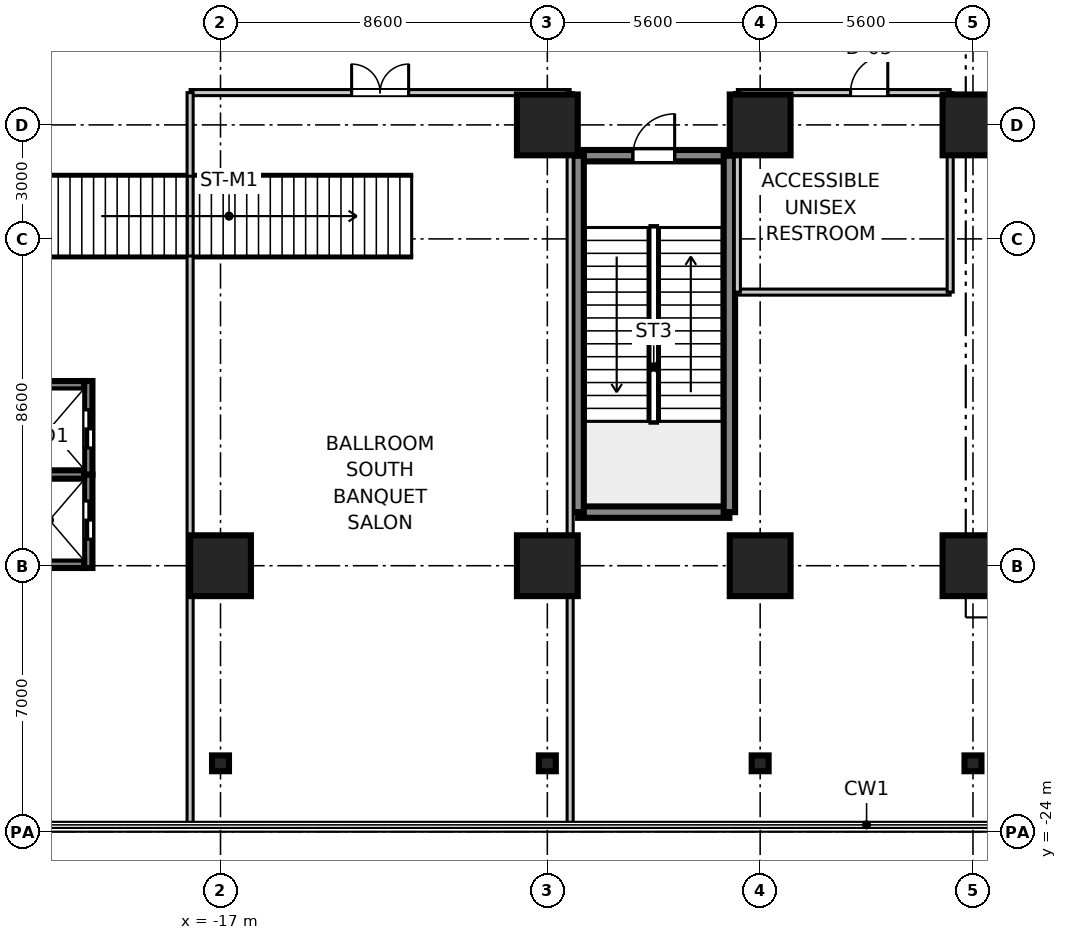
"""IFC4 building model, lengths in metres.
Left out: names, types, materials, properties, quantities, classifications, styles, units other than length and angle.
Written with IfcOpenShell. Run it as: python <this file> out.ifc"""

import sys

from ifc_helpers import new_model, si_unit, direction, frame, frame_2d, origin, origin_2d, place, context, subcontext, project, spatial, rectangle, i_section, extrude, source, transform, mapped, element, fill, save


model = new_model("IFC4")
c1 = context("Model", 3, precision=1e-05, world=origin(), true_north=direction((0.0, 1.0)))
c2 = subcontext(c1, "Body", "Model", "MODEL_VIEW")
j1 = project(units=[si_unit("LENGTHUNIT", "METRE"), si_unit("PLANEANGLEUNIT", "RADIAN")], contexts=[c1])
p1 = place(None, origin())
s1 = spatial("IfcSite", under=j1, at=p1, CompositionType="ELEMENT")
p2 = place(p1, origin())
s2 = spatial("IfcBuilding", under=s1, at=p2, CompositionType="ELEMENT")
p3 = place(p2, frame((0.0, 0.0, 16.2)))
s3 = spatial("IfcBuildingStorey", under=s2, at=p3, CompositionType="ELEMENT", Elevation=16.2)
m1 = source(origin(), c2, "Body", "SweptSolid", [
    extrude(rectangle(XDim=1.6, YDim=1.6, at=origin_2d()), origin(), (0.0, 0.0, 1.0), 5.355),
])
for number, where, z_axis, x_axis in (
    (1, (-17.0, -17.0, 0.0), (0.0, 0.0, 1.0), (1.0, 0.0, 0.0)),
    (2, (-8.4, -17.0, 0.0), (0.0, 0.0, 1.0), (1.0, 0.0, 0.0)),
    (3, (-8.4, -5.4, 0.0), (0.0, 0.0, 1.0), (1.0, 0.0, 0.0)),
    (4, (-2.8, -17.0, 0.0), (0.0, 0.0, 1.0), (1.0, 0.0, 0.0)),
    (5, (-2.8, -5.4, 0.0), (0.0, 0.0, 1.0), (1.0, 0.0, 0.0)),
    (6, (2.8, -17.0, 0.0), (0.0, 0.0, 1.0), (1.0, 0.0, 0.0)),
    (7, (2.8, -5.4, 0.0), (0.0, 0.0, 1.0), (1.0, 0.0, 0.0)),
):
    element("IfcColumn", number, at=place(p3, frame(where, z_axis=z_axis, x_axis=x_axis)), inside=s3, PredefinedType="COLUMN", context=c2, shape_type="MappedRepresentation", body=[
        mapped(m1, transform((0.0, 0.0, 0.0), scale=1.0)),
    ])
m2 = source(origin(), c2, "Body", "SweptSolid", [
    extrude(i_section(OverallWidth=0.416, OverallDepth=0.446, WebThickness=0.025, FlangeThickness=0.04, at=origin_2d()), origin(), (0.0, 0.0, 1.0), 5.355),
])
for number, where, z_axis, x_axis in (
    (8, (-17.0, -22.2, 0.0), (0.0, 0.0, 1.0), (0.0, 1.0, 0.0)),
    (9, (-8.4, -22.2, 0.0), (0.0, 0.0, 1.0), (0.0, 1.0, 0.0)),
    (10, (-2.8, -22.2, 0.0), (0.0, 0.0, 1.0), (0.0, 1.0, 0.0)),
    (11, (2.8, -22.2, 0.0), (0.0, 0.0, 1.0), (0.0, 1.0, 0.0)),
):
    element("IfcColumn", number, at=place(p3, frame(where, z_axis=z_axis, x_axis=x_axis)), inside=s3, PredefinedType="COLUMN", context=c2, shape_type="MappedRepresentation", body=[
        mapped(m2, transform((0.0, 0.0, 0.0), scale=1.0)),
    ])
m3 = source(origin(), c2, "Body", "SweptSolid", [
    extrude(rectangle(XDim=3.98, YDim=0.3, at=frame_2d((1.99, 0.0))), origin(), (0.0, 0.0, 1.0), 5.08),
])
p4 = place(p3, frame((-7.59, -15.59, 0.0), z_axis=(0.0, 0.0, 1.0), x_axis=(1.0, 0.0, 0.0)))
e12 = element("IfcWall", 12, at=p4, inside=s3, PredefinedType="SHEAR", context=c2, shape_type="MappedRepresentation", body=[
    mapped(m3, transform((0.0, 0.0, 0.0), scale=1.0)),
])
p5 = place(p3, frame((-7.59, -6.21, 0.0), z_axis=(0.0, 0.0, 1.0), x_axis=(1.0, 0.0, 0.0)))
e13 = element("IfcWall", 13, at=p5, inside=s3, PredefinedType="SHEAR", context=c2, shape_type="MappedRepresentation", body=[
    mapped(m3, transform((0.0, 0.0, 0.0), scale=1.0)),
])
p6 = place(p5, frame((1.44, 0.0, 0.0)))
e14 = element("IfcOpeningElement", 14, at=p6, cuts=e13, PredefinedType="OPENING", context=c2, shape_type="SweptSolid", body=[
    extrude(rectangle(XDim=1.1, YDim=2.15, at=frame_2d((0.55, 1.075))), frame((0.0, 0.16, 0.0), z_axis=(0.0, -1.0, 0.0), x_axis=(1.0, 0.0, 0.0)), (0.0, 0.0, 1.0), 0.32),
])
m4 = source(origin(), c2, "Body", "SweptSolid", [
    extrude(rectangle(XDim=9.38, YDim=0.3, at=frame_2d((4.69, 0.0))), origin(), (0.0, 0.0, 1.0), 5.08),
])
for number, where, z_axis, x_axis in (
    (15, (-7.59, -15.59, 0.0), (0.0, 0.0, 1.0), (0.0, 1.0, 0.0)),
    (16, (-3.61, -15.59, 0.0), (0.0, 0.0, 1.0), (0.0, 1.0, 0.0)),
):
    element("IfcWall", number, at=place(p3, frame(where, z_axis=z_axis, x_axis=x_axis)), inside=s3, PredefinedType="SHEAR", context=c2, shape_type="MappedRepresentation", body=[
        mapped(m4, transform((0.0, 0.0, 0.0), scale=1.0)),
    ])
m5 = source(origin(), c2, "Body", "SweptSolid", [
    extrude(rectangle(XDim=2.46, YDim=0.22, at=frame_2d((1.23, 0.0))), origin(), (0.0, 0.0, 1.0), 5.08),
])
p7 = place(p3, frame((-20.48, -17.06, 0.0), z_axis=(0.0, 0.0, 1.0), x_axis=(0.0, 1.0, 0.0)))
e17 = element("IfcWall", 17, at=p7, inside=s3, PredefinedType="SHEAR", context=c2, shape_type="MappedRepresentation", body=[
    mapped(m5, transform((0.0, 0.0, 0.0), scale=1.0)),
])
p8 = place(p7, frame((0.76, 0.0, 0.0)))
e18 = element("IfcOpeningElement", 18, at=p8, cuts=e17, PredefinedType="OPENING", context=c2, shape_type="SweptSolid", body=[
    extrude(rectangle(XDim=1.0, YDim=2.2, at=frame_2d((0.5, 1.1))), frame((0.0, 0.12, 0.0), z_axis=(0.0, -1.0, 0.0), x_axis=(1.0, 0.0, 0.0)), (0.0, 0.0, 1.0), 0.24),
])
m6 = source(origin(), c2, "Body", "SweptSolid", [
    extrude(rectangle(XDim=1.82, YDim=0.22, at=frame_2d((0.91, 0.0))), origin(), (0.0, 0.0, 1.0), 5.08),
])
p9 = place(p3, frame((-22.41, -16.95, 0.0), z_axis=(0.0, 0.0, 1.0), x_axis=(1.0, 0.0, 0.0)))
e19 = element("IfcWall", 19, at=p9, inside=s3, PredefinedType="SHEAR", context=c2, shape_type="MappedRepresentation", body=[
    mapped(m6, transform((0.0, 0.0, 0.0), scale=1.0)),
])
m7 = source(origin(), c2, "Body", "SweptSolid", [
    extrude(rectangle(XDim=1.82, YDim=0.22, at=frame_2d((0.91, 0.0))), origin(), (0.0, 0.0, 1.0), 5.4),
])
p10 = place(p3, frame((-22.41, -14.6, 0.0), z_axis=(0.0, 0.0, 1.0), x_axis=(1.0, 0.0, 0.0)))
e20 = element("IfcWall", 20, at=p10, inside=s3, PredefinedType="SHEAR", context=c2, shape_type="MappedRepresentation", body=[
    mapped(m7, transform((0.0, 0.0, 0.0), scale=1.0)),
])
m8 = source(origin(), c2, "Body", "SweptSolid", [
    extrude(rectangle(XDim=2.46, YDim=0.22, at=frame_2d((1.23, 0.0))), origin(), (0.0, 0.0, 1.0), 5.08),
])
p11 = place(p3, frame((-20.48, -14.6, 0.0), z_axis=(0.0, 0.0, 1.0), x_axis=(0.0, 1.0, 0.0)))
e21 = element("IfcWall", 21, at=p11, inside=s3, PredefinedType="SHEAR", context=c2, shape_type="MappedRepresentation", body=[
    mapped(m8, transform((0.0, 0.0, 0.0), scale=1.0)),
])
p12 = place(p11, frame((0.7, 0.0, 0.0)))
e22 = element("IfcOpeningElement", 22, at=p12, cuts=e21, PredefinedType="OPENING", context=c2, shape_type="SweptSolid", body=[
    extrude(rectangle(XDim=1.0, YDim=2.2, at=frame_2d((0.5, 1.1))), frame((0.0, 0.12, 0.0), z_axis=(0.0, -1.0, 0.0), x_axis=(1.0, 0.0, 0.0)), (0.0, 0.0, 1.0), 0.24),
])
p13 = place(p3, frame((-22.41, -12.25, 0.0), z_axis=(0.0, 0.0, 1.0), x_axis=(1.0, 0.0, 0.0)))
e23 = element("IfcWall", 23, at=p13, inside=s3, PredefinedType="SHEAR", context=c2, shape_type="MappedRepresentation", body=[
    mapped(m6, transform((0.0, 0.0, 0.0), scale=1.0)),
])
m9 = source(origin(), c2, "Body", "SweptSolid", [
    extrude(rectangle(XDim=10.0, YDim=0.16, at=frame_2d((5.0, 0.0))), origin(), (0.0, 0.0, 1.0), 3.4),
])
p14 = place(p3, frame((-17.8, -4.55, 0.0), z_axis=(0.0, 0.0, 1.0), x_axis=(1.0, 0.0, 0.0)))
e24 = element("IfcWall", 24, at=p14, inside=s3, PredefinedType="PARTITIONING", context=c2, shape_type="MappedRepresentation", body=[
    mapped(m9, transform((0.0, 0.0, 0.0), scale=1.0)),
])
p15 = place(p14, frame((4.25, 0.0, 0.0)))
e25 = element("IfcOpeningElement", 25, at=p15, cuts=e24, PredefinedType="OPENING", context=c2, shape_type="SweptSolid", body=[
    extrude(rectangle(XDim=1.5, YDim=2.15, at=frame_2d((0.75, 1.075))), frame((0.0, 0.09, 0.0), z_axis=(0.0, -1.0, 0.0), x_axis=(1.0, 0.0, 0.0)), (0.0, 0.0, 1.0), 0.18),
])
m10 = source(origin(), c2, "Body", "SweptSolid", [
    extrude(rectangle(XDim=19.21, YDim=0.16, at=frame_2d((9.605, 0.0))), origin(), (0.0, 0.0, 1.0), 3.4),
])
for number, where, z_axis, x_axis in (
    (26, (-17.8, -23.76, 0.0), (0.0, 0.0, 1.0), (0.0, 1.0, 0.0)),
    (27, (-7.8, -23.76, 0.0), (0.0, 0.0, 1.0), (0.0, 1.0, 0.0)),
):
    element("IfcWall", number, at=place(p3, frame(where, z_axis=z_axis, x_axis=x_axis)), inside=s3, PredefinedType="PARTITIONING", context=c2, shape_type="MappedRepresentation", body=[
        mapped(m10, transform((0.0, 0.0, 0.0), scale=1.0)),
    ])
m11 = source(origin(), c2, "Body", "SweptSolid", [
    extrude(rectangle(XDim=5.6, YDim=0.16, at=frame_2d((2.8, 0.0))), origin(), (0.0, 0.0, 1.0), 3.4),
])
p16 = place(p3, frame((-3.4, -9.8, 0.0), z_axis=(0.0, 0.0, 1.0), x_axis=(1.0, 0.0, 0.0)))
e28 = element("IfcWall", 28, at=p16, inside=s3, PredefinedType="PARTITIONING", context=c2, shape_type="MappedRepresentation", body=[
    mapped(m11, transform((0.0, 0.0, 0.0), scale=1.0)),
])
p17 = place(p3, frame((-3.4, -4.55, 0.0), z_axis=(0.0, 0.0, 1.0), x_axis=(1.0, 0.0, 0.0)))
e29 = element("IfcWall", 29, at=p17, inside=s3, PredefinedType="PARTITIONING", context=c2, shape_type="MappedRepresentation", body=[
    mapped(m11, transform((0.0, 0.0, 0.0), scale=1.0)),
])
p18 = place(p17, frame((2.978, 0.0, 0.0)))
e30 = element("IfcOpeningElement", 30, at=p18, cuts=e29, PredefinedType="OPENING", context=c2, shape_type="SweptSolid", body=[
    extrude(rectangle(XDim=0.98, YDim=2.1, at=frame_2d((0.49, 1.05))), frame((0.0, 0.09, 0.0), z_axis=(0.0, -1.0, 0.0), x_axis=(1.0, 0.0, 0.0)), (0.0, 0.0, 1.0), 0.18),
])
m12 = source(origin(), c2, "Body", "SweptSolid", [
    extrude(rectangle(XDim=5.25, YDim=0.16, at=frame_2d((2.625, 0.0))), origin(), (0.0, 0.0, 1.0), 3.4),
])
for number, where, z_axis, x_axis in (
    (31, (-3.4, -9.8, 0.0), (0.0, 0.0, 1.0), (0.0, 1.0, 0.0)),
    (32, (2.2, -9.8, 0.0), (0.0, 0.0, 1.0), (0.0, 1.0, 0.0)),
):
    element("IfcWall", number, at=place(p3, frame(where, z_axis=z_axis, x_axis=x_axis)), inside=s3, PredefinedType="PARTITIONING", context=c2, shape_type="MappedRepresentation", body=[
        mapped(m12, transform((0.0, 0.0, 0.0), scale=1.0)),
    ])
m13 = source(origin(), c2, "Body", "SweptSolid", [
    extrude(rectangle(XDim=1.1, YDim=2.15, at=frame_2d((0.55, 1.075))), frame((0.0, 0.025, 0.0), z_axis=(0.0, -1.0, 0.0), x_axis=(1.0, 0.0, 0.0)), (0.0, 0.0, 1.0), 0.05),
])
p19 = place(p6, frame((1.1, 0.0, 0.0), z_axis=(0.0, 0.0, 1.0), x_axis=(-1.0, 0.0, 0.0)))
e33 = element("IfcDoor", 33, at=p19, inside=s3, OperationType="SINGLE_SWING_RIGHT", PredefinedType="DOOR", context=c2, shape_type="MappedRepresentation", body=[
    mapped(m13, transform((0.0, 0.0, 0.0), scale=1.0)),
])
fill(e14, e33)
m14 = source(origin(), c2, "Body", "SweptSolid", [
    extrude(rectangle(XDim=1.0, YDim=2.2, at=frame_2d((0.5, 1.1))), frame((0.0, 0.025, 0.0), z_axis=(0.0, -1.0, 0.0), x_axis=(1.0, 0.0, 0.0)), (0.0, 0.0, 1.0), 0.05),
])
p20 = place(p8, frame((1.0, 0.0, 0.0), z_axis=(0.0, 0.0, 1.0), x_axis=(-1.0, 0.0, 0.0)))
e34 = element("IfcDoor", 34, at=p20, inside=s3, OperationType="DOUBLE_DOOR_SLIDING", PredefinedType="DOOR", context=c2, shape_type="MappedRepresentation", body=[
    mapped(m14, transform((0.0, 0.0, 0.0), scale=1.0)),
])
fill(e18, e34)
p21 = place(p12, frame((1.0, 0.0, 0.0), z_axis=(0.0, 0.0, 1.0), x_axis=(-1.0, 0.0, 0.0)))
e35 = element("IfcDoor", 35, at=p21, inside=s3, OperationType="DOUBLE_DOOR_SLIDING", PredefinedType="DOOR", context=c2, shape_type="MappedRepresentation", body=[
    mapped(m14, transform((0.0, 0.0, 0.0), scale=1.0)),
])
fill(e22, e35)
m15 = source(origin(), c2, "Body", "SweptSolid", [
    extrude(rectangle(XDim=1.5, YDim=2.15, at=frame_2d((0.75, 1.075))), frame((0.0, 0.025, 0.0), z_axis=(0.0, -1.0, 0.0), x_axis=(1.0, 0.0, 0.0)), (0.0, 0.0, 1.0), 0.05),
])
p22 = place(p15, frame((1.5, 0.0, 0.0), z_axis=(0.0, 0.0, 1.0), x_axis=(-1.0, 0.0, 0.0)))
e36 = element("IfcDoor", 36, at=p22, inside=s3, OperationType="DOUBLE_DOOR_SINGLE_SWING", PredefinedType="DOOR", context=c2, shape_type="MappedRepresentation", body=[
    mapped(m15, transform((0.0, 0.0, 0.0), scale=1.0)),
])
fill(e25, e36)
m16 = source(origin(), c2, "Body", "SweptSolid", [
    extrude(rectangle(XDim=0.98, YDim=2.1, at=frame_2d((0.49, 1.05))), frame((0.0, 0.025, 0.0), z_axis=(0.0, -1.0, 0.0), x_axis=(1.0, 0.0, 0.0)), (0.0, 0.0, 1.0), 0.05),
])
p23 = place(p18, frame((0.98, 0.0, 0.0), z_axis=(0.0, 0.0, 1.0), x_axis=(-1.0, 0.0, 0.0)))
e37 = element("IfcDoor", 37, at=p23, inside=s3, OperationType="SINGLE_SWING_RIGHT", PredefinedType="DOOR", context=c2, shape_type="MappedRepresentation", body=[
    mapped(m16, transform((0.0, 0.0, 0.0), scale=1.0)),
])
fill(e30, e37)
save(model, sys.argv[1])
